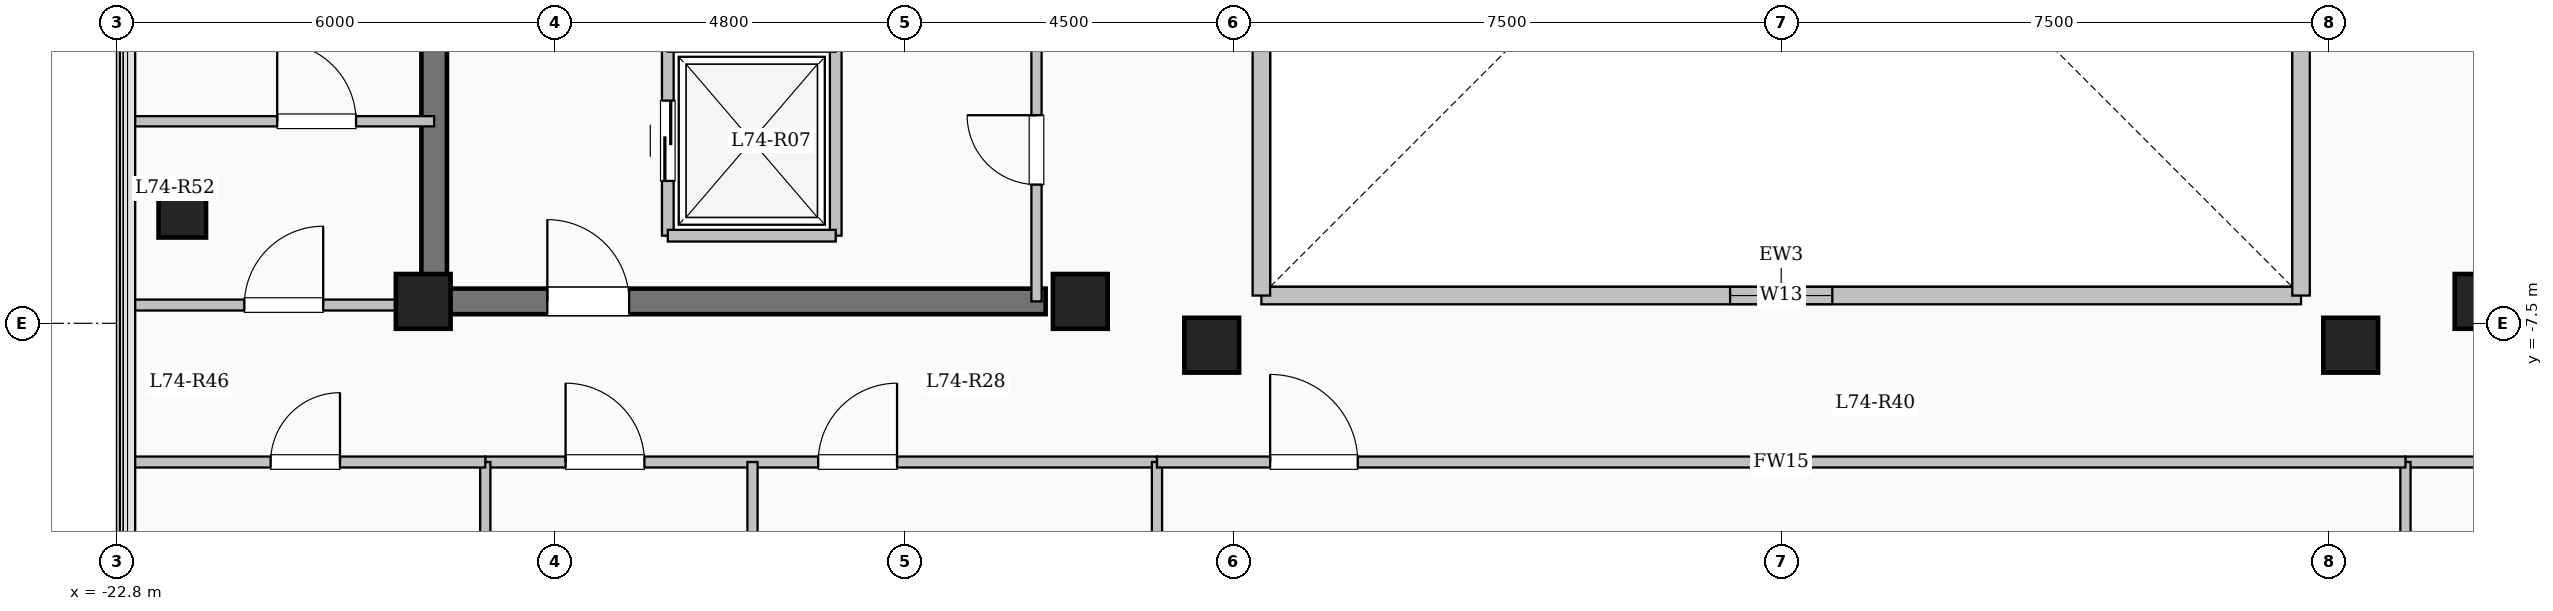
"""IFC4 building model, lengths in metres.
Left out: names, types, materials, properties, quantities, classifications, styles, units other than length and angle.
Written with IfcOpenShell. Run it as: python <this file> out.ifc"""

import sys

from ifc_helpers import new_model, si_unit, direction, frame, frame_2d, origin, origin_2d, place, context, subcontext, project, spatial, rectangle, extrude, element, fill, save


model = new_model("IFC4")
c1 = context("Model", 3, precision=1e-05, world=origin(), true_north=direction((0.0, 1.0)))
c2 = subcontext(c1, "Body", "Model", "MODEL_VIEW")
j1 = project(units=[si_unit("LENGTHUNIT", "METRE"), si_unit("PLANEANGLEUNIT", "RADIAN")], contexts=[c1])
p1 = place(None, origin())
s1 = spatial("IfcSite", under=j1, at=p1, CompositionType="ELEMENT")
p2 = place(p1, origin())
s2 = spatial("IfcBuilding", under=s1, at=p2, CompositionType="ELEMENT")
p3 = place(p2, frame((0.0, 0.0, 271.65)))
s3 = spatial("IfcBuildingStorey", under=s2, at=p3, CompositionType="ELEMENT", Elevation=271.65)
for number, where, z_axis, x_axis in (
    (1, (-7.8, -7.8, 0.0), (0.0, 0.0, 1.0), (1.0, 0.0, 0.0)),
    (2, (7.8, -7.8, 0.0), (0.0, 0.0, 1.0), (1.0, 0.0, 0.0)),
    (3, (-9.6, -7.2, 0.0), (0.0, 0.0, 1.0), (1.0, 0.0, 0.0)),
    (4, (9.6, -7.2, 0.0), (0.0, 0.0, 1.0), (1.0, 0.0, 0.0)),
    (5, (-18.6, -7.2, 0.0), (0.0, 0.0, 1.0), (1.0, 0.0, 0.0)),
):
    element("IfcColumn", number, at=place(p3, frame(where, z_axis=z_axis, x_axis=x_axis)), inside=s3, PredefinedType="COLUMN", context=c2, shape_type="SweptSolid", body=[
        extrude(rectangle(XDim=0.75, YDim=0.75, at=origin_2d()), origin(), (0.0, 0.0, 1.0), 4.65),
    ])
p4 = place(p3, frame((-21.9, -6.0, 0.0), z_axis=(0.0, 0.0, 1.0), x_axis=(1.0, 0.0, 0.0)))
e6 = element("IfcColumn", 6, at=p4, inside=s3, PredefinedType="COLUMN", context=c2, shape_type="SweptSolid", body=[
    extrude(rectangle(XDim=0.65, YDim=0.65, at=origin_2d()), origin(), (0.0, 0.0, 1.0), 4.65),
])
p5 = place(p3, frame((-7.12, -7.12, 0.0), z_axis=(0.0, 0.0, 1.0), x_axis=(1.0, 0.0, 0.0)))
e7 = element("IfcWall", 7, at=p5, inside=s3, PredefinedType="SOLIDWALL", context=c2, shape_type="SweptSolid", body=[
    extrude(rectangle(XDim=14.24, YDim=0.24, at=frame_2d((7.12, 0.0))), origin(), (0.0, 0.0, 1.0), 4.35),
])
p6 = place(p5, frame((6.42, 0.0, 0.95)))
e8 = element("IfcOpeningElement", 8, at=p6, cuts=e7, PredefinedType="OPENING", context=c2, shape_type="SweptSolid", body=[
    extrude(rectangle(XDim=1.4, YDim=1.5, at=frame_2d((0.7, 0.75))), frame((0.0, 0.13, 0.0), z_axis=(0.0, -1.0, 0.0), x_axis=(1.0, 0.0, 0.0)), (0.0, 0.0, 1.0), 0.26),
])
p7 = place(p3, frame((7.12, -7.12, 0.0), z_axis=(0.0, 0.0, 1.0), x_axis=(0.0, 1.0, 0.0)))
e9 = element("IfcWall", 9, at=p7, inside=s3, PredefinedType="SOLIDWALL", context=c2, shape_type="SweptSolid", body=[
    extrude(rectangle(XDim=14.24, YDim=0.24, at=frame_2d((7.12, 0.0))), origin(), (0.0, 0.0, 1.0), 4.35),
])
p8 = place(p7, frame((6.42, 0.0, 0.95)))
e10 = element("IfcOpeningElement", 10, at=p8, cuts=e9, PredefinedType="OPENING", context=c2, shape_type="SweptSolid", body=[
    extrude(rectangle(XDim=1.4, YDim=1.5, at=frame_2d((0.7, 0.75))), frame((0.0, 0.13, 0.0), z_axis=(0.0, -1.0, 0.0), x_axis=(1.0, 0.0, 0.0)), (0.0, 0.0, 1.0), 0.26),
])
p9 = place(p3, frame((-7.12, 7.12, 0.0), z_axis=(0.0, 0.0, 1.0), x_axis=(0.0, -1.0, 0.0)))
e11 = element("IfcWall", 11, at=p9, inside=s3, PredefinedType="SOLIDWALL", context=c2, shape_type="SweptSolid", body=[
    extrude(rectangle(XDim=14.24, YDim=0.24, at=frame_2d((7.12, 0.0))), origin(), (0.0, 0.0, 1.0), 4.35),
])
p10 = place(p9, frame((6.42, 0.0, 0.95)))
e12 = element("IfcOpeningElement", 12, at=p10, cuts=e11, PredefinedType="OPENING", context=c2, shape_type="SweptSolid", body=[
    extrude(rectangle(XDim=1.4, YDim=1.5, at=frame_2d((0.7, 0.75))), frame((0.0, 0.13, 0.0), z_axis=(0.0, -1.0, 0.0), x_axis=(1.0, 0.0, 0.0)), (0.0, 0.0, 1.0), 0.26),
])
p11 = place(p3, frame((-15.25, -6.3, 0.0), z_axis=(0.0, 0.0, 1.0), x_axis=(0.0, 1.0, 0.0)))
e13 = element("IfcWall", 13, at=p11, inside=s3, PredefinedType="SOLIDWALL", context=c2, shape_type="SweptSolid", body=[
    extrude(rectangle(XDim=2.6, YDim=0.16, at=frame_2d((1.3, 0.0))), origin(), (0.0, 0.0, 1.0), 4.35),
])
p12 = place(p11, frame((0.75, 0.0, 0.0)))
e14 = element("IfcOpeningElement", 14, at=p12, cuts=e13, PredefinedType="OPENING", context=c2, shape_type="SweptSolid", body=[
    extrude(rectangle(XDim=1.1, YDim=2.15, at=frame_2d((0.55, 1.075))), frame((0.0, 0.09, 0.0), z_axis=(0.0, -1.0, 0.0), x_axis=(1.0, 0.0, 0.0)), (0.0, 0.0, 1.0), 0.18),
])
p13 = place(p3, frame((-12.95, -6.3, 0.0), z_axis=(0.0, 0.0, 1.0), x_axis=(0.0, 1.0, 0.0)))
e15 = element("IfcWall", 15, at=p13, inside=s3, PredefinedType="SOLIDWALL", context=c2, shape_type="SweptSolid", body=[
    extrude(rectangle(XDim=2.6, YDim=0.16, at=frame_2d((1.3, 0.0))), origin(), (0.0, 0.0, 1.0), 4.35),
])
p14 = place(p3, frame((-15.25, -6.3, 0.0), z_axis=(0.0, 0.0, 1.0), x_axis=(1.0, 0.0, 0.0)))
e16 = element("IfcWall", 16, at=p14, inside=s3, PredefinedType="SOLIDWALL", context=c2, shape_type="SweptSolid", body=[
    extrude(rectangle(XDim=2.3, YDim=0.16, at=frame_2d((1.15, 0.0))), origin(), (0.0, 0.0, 1.0), 4.35),
])
p15 = place(p3, frame((-18.45, -7.375, 0.0), z_axis=(0.0, 0.0, 1.0), x_axis=(0.0, 1.0, 0.0)))
e17 = element("IfcWall", 17, at=p15, inside=s3, PredefinedType="SHEAR", context=c2, shape_type="SweptSolid", body=[
    extrude(rectangle(XDim=14.05, YDim=0.35, at=frame_2d((7.025, 0.0))), origin(), (0.0, 0.0, 1.0), 4.65),
])
p16 = place(p3, frame((-18.625, -7.2, 0.0), z_axis=(0.0, 0.0, 1.0), x_axis=(1.0, 0.0, 0.0)))
e18 = element("IfcWall", 18, at=p16, inside=s3, PredefinedType="SHEAR", context=c2, shape_type="SweptSolid", body=[
    extrude(rectangle(XDim=8.55, YDim=0.35, at=frame_2d((4.275, 0.0))), origin(), (0.0, 0.0, 1.0), 4.65),
])
p17 = place(p16, frame((1.725, 0.0, 0.0)))
e19 = element("IfcOpeningElement", 19, at=p17, cuts=e18, PredefinedType="OPENING", context=c2, shape_type="SweptSolid", body=[
    extrude(rectangle(XDim=1.12, YDim=2.15, at=frame_2d((0.56, 1.075))), frame((0.0, 0.185, 0.0), z_axis=(0.0, -1.0, 0.0), x_axis=(1.0, 0.0, 0.0)), (0.0, 0.0, 1.0), 0.37),
])
p18 = place(p3, frame((-10.2, -7.2, 0.0), z_axis=(0.0, 0.0, 1.0), x_axis=(0.0, 1.0, 0.0)))
e20 = element("IfcWall", 20, at=p18, inside=s3, PredefinedType="PARTITIONING", context=c2, shape_type="SweptSolid", body=[
    extrude(rectangle(XDim=9.12, YDim=0.14, at=frame_2d((4.56, 0.0))), origin(), (0.0, 0.0, 1.0), 4.35),
])
p19 = place(p18, frame((1.6, 0.0, 0.0)))
e21 = element("IfcOpeningElement", 21, at=p19, cuts=e20, PredefinedType="OPENING", context=c2, shape_type="SweptSolid", body=[
    extrude(rectangle(XDim=0.95, YDim=2.12, at=frame_2d((0.475, 1.06))), frame((0.0, 0.08, 0.0), z_axis=(0.0, -1.0, 0.0), x_axis=(1.0, 0.0, 0.0)), (0.0, 0.0, 1.0), 0.16),
])
p20 = place(p18, frame((7.9, 0.0, 0.0)))
e22 = element("IfcOpeningElement", 22, at=p20, cuts=e20, PredefinedType="OPENING", context=c2, shape_type="SweptSolid", body=[
    extrude(rectangle(XDim=0.95, YDim=2.12, at=frame_2d((0.475, 1.06))), frame((0.0, 0.08, 0.0), z_axis=(0.0, -1.0, 0.0), x_axis=(1.0, 0.0, 0.0)), (0.0, 0.0, 1.0), 0.16),
])
p21 = place(p3, frame((-17.75, -9.4, 0.0), z_axis=(0.0, 0.0, 1.0), x_axis=(1.0, 0.0, 0.0)))
e23 = element("IfcWall", 23, at=p21, inside=s3, PredefinedType="PARTITIONING", context=c2, shape_type="SweptSolid", body=[
    extrude(rectangle(XDim=9.2, YDim=0.15, at=frame_2d((4.6, 0.0))), origin(), (0.0, 0.0, 1.0), 4.35),
])
p22 = place(p21, frame((1.1, 0.0, 0.0)))
e24 = element("IfcOpeningElement", 24, at=p22, cuts=e23, PredefinedType="OPENING", context=c2, shape_type="SweptSolid", body=[
    extrude(rectangle(XDim=1.08, YDim=2.15, at=frame_2d((0.54, 1.075))), frame((0.0, 0.085, 0.0), z_axis=(0.0, -1.0, 0.0), x_axis=(1.0, 0.0, 0.0)), (0.0, 0.0, 1.0), 0.17),
])
p23 = place(p21, frame((4.56, 0.0, 0.0)))
e25 = element("IfcOpeningElement", 25, at=p23, cuts=e23, PredefinedType="OPENING", context=c2, shape_type="SweptSolid", body=[
    extrude(rectangle(XDim=1.08, YDim=2.15, at=frame_2d((0.54, 1.075))), frame((0.0, 0.085, 0.0), z_axis=(0.0, -1.0, 0.0), x_axis=(1.0, 0.0, 0.0)), (0.0, 0.0, 1.0), 0.17),
])
p24 = place(p3, frame((8.55, -9.4, 0.0), z_axis=(0.0, 0.0, 1.0), x_axis=(1.0, 0.0, 0.0)))
e26 = element("IfcWall", 26, at=p24, inside=s3, PredefinedType="PARTITIONING", context=c2, shape_type="SweptSolid", body=[
    extrude(rectangle(XDim=9.2, YDim=0.15, at=frame_2d((4.6, 0.0))), origin(), (0.0, 0.0, 1.0), 4.35),
])
p25 = place(p24, frame((1.1, 0.0, 0.0)))
e27 = element("IfcOpeningElement", 27, at=p25, cuts=e26, PredefinedType="OPENING", context=c2, shape_type="SweptSolid", body=[
    extrude(rectangle(XDim=1.08, YDim=2.15, at=frame_2d((0.54, 1.075))), frame((0.0, 0.085, 0.0), z_axis=(0.0, -1.0, 0.0), x_axis=(1.0, 0.0, 0.0)), (0.0, 0.0, 1.0), 0.17),
])
p26 = place(p24, frame((5.991, 0.0, 0.0)))
e28 = element("IfcOpeningElement", 28, at=p26, cuts=e26, PredefinedType="OPENING", context=c2, shape_type="SweptSolid", body=[
    extrude(rectangle(XDim=1.2, YDim=2.15, at=frame_2d((0.6, 1.075))), frame((0.0, 0.085, 0.0), z_axis=(0.0, -1.0, 0.0), x_axis=(1.0, 0.0, 0.0)), (0.0, 0.0, 1.0), 0.17),
])
p27 = place(p3, frame((-14.09, -20.9, 0.0), z_axis=(0.0, 0.0, 1.0), x_axis=(0.0, 1.0, 0.0)))
e29 = element("IfcWall", 29, at=p27, inside=s3, PredefinedType="PARTITIONING", context=c2, shape_type="SweptSolid", body=[
    extrude(rectangle(XDim=11.5, YDim=0.14, at=frame_2d((5.75, 0.0))), origin(), (0.0, 0.0, 1.0), 4.35),
])
for number, where, z_axis, x_axis in (
    (30, (-8.55, -21.504, 0.0), (0.0, 0.0, 1.0), (0.0, 1.0, 0.0)),
    (31, (8.55, -21.504, 0.0), (0.0, 0.0, 1.0), (0.0, 1.0, 0.0)),
):
    element("IfcWall", number, at=place(p3, frame(where, z_axis=z_axis, x_axis=x_axis)), inside=s3, PredefinedType="PARTITIONING", context=c2, shape_type="SweptSolid", body=[
        extrude(rectangle(XDim=12.104, YDim=0.14, at=frame_2d((6.052, 0.0))), origin(), (0.0, 0.0, 1.0), 4.35),
    ])
p28 = place(p3, frame((-8.55, -9.4, 0.0), z_axis=(0.0, 0.0, 1.0), x_axis=(1.0, 0.0, 0.0)))
e32 = element("IfcWall", 32, at=p28, inside=s3, PredefinedType="PARTITIONING", context=c2, shape_type="SweptSolid", body=[
    extrude(rectangle(XDim=17.1, YDim=0.15, at=frame_2d((8.55, 0.0))), origin(), (0.0, 0.0, 1.0), 4.35),
])
p29 = place(p28, frame((1.55, 0.0, 0.0)))
e33 = element("IfcOpeningElement", 33, at=p29, cuts=e32, PredefinedType="OPENING", context=c2, shape_type="SweptSolid", body=[
    extrude(rectangle(XDim=1.2, YDim=2.15, at=frame_2d((0.6, 1.075))), frame((0.0, 0.085, 0.0), z_axis=(0.0, -1.0, 0.0), x_axis=(1.0, 0.0, 0.0)), (0.0, 0.0, 1.0), 0.17),
])
p30 = place(p3, frame((-22.68, -7.25, 0.0), z_axis=(0.0, 0.0, 1.0), x_axis=(1.0, 0.0, 0.0)))
e34 = element("IfcWall", 34, at=p30, inside=s3, PredefinedType="PARTITIONING", context=c2, shape_type="SweptSolid", body=[
    extrude(rectangle(XDim=4.23, YDim=0.15, at=frame_2d((2.115, 0.0))), origin(), (0.0, 0.0, 1.0), 4.35),
])
p31 = place(p30, frame((1.63, 0.0, 0.0)))
e35 = element("IfcOpeningElement", 35, at=p31, cuts=e34, PredefinedType="OPENING", context=c2, shape_type="SweptSolid", body=[
    extrude(rectangle(XDim=1.08, YDim=2.15, at=frame_2d((0.54, 1.075))), frame((0.0, 0.085, 0.0), z_axis=(0.0, -1.0, 0.0), x_axis=(1.0, 0.0, 0.0)), (0.0, 0.0, 1.0), 0.17),
])
p32 = place(p3, frame((-17.75, -17.55, 0.0), z_axis=(0.0, 0.0, 1.0), x_axis=(0.0, 1.0, 0.0)))
e36 = element("IfcWall", 36, at=p32, inside=s3, PredefinedType="PARTITIONING", context=c2, shape_type="SweptSolid", body=[
    extrude(rectangle(XDim=8.15, YDim=0.14, at=frame_2d((4.075, 0.0))), origin(), (0.0, 0.0, 1.0), 4.35),
])
p33 = place(p3, frame((-22.68, -9.4, 0.0), z_axis=(0.0, 0.0, 1.0), x_axis=(1.0, 0.0, 0.0)))
e37 = element("IfcWall", 37, at=p33, inside=s3, PredefinedType="PARTITIONING", context=c2, shape_type="SweptSolid", body=[
    extrude(rectangle(XDim=4.93, YDim=0.15, at=frame_2d((2.465, 0.0))), origin(), (0.0, 0.0, 1.0), 4.35),
])
p34 = place(p33, frame((1.99, 0.0, 0.0)))
e38 = element("IfcOpeningElement", 38, at=p34, cuts=e37, PredefinedType="OPENING", context=c2, shape_type="SweptSolid", body=[
    extrude(rectangle(XDim=0.95, YDim=2.15, at=frame_2d((0.475, 1.075))), frame((0.0, 0.085, 0.0), z_axis=(0.0, -1.0, 0.0), x_axis=(1.0, 0.0, 0.0)), (0.0, 0.0, 1.0), 0.17),
])
p35 = place(p3, frame((-22.68, -4.733, 0.0), z_axis=(0.0, 0.0, 1.0), x_axis=(1.0, 0.0, 0.0)))
e39 = element("IfcWall", 39, at=p35, inside=s3, PredefinedType="PARTITIONING", context=c2, shape_type="SweptSolid", body=[
    extrude(rectangle(XDim=4.23, YDim=0.14, at=frame_2d((2.115, 0.0))), origin(), (0.0, 0.0, 1.0), 4.35),
])
p36 = place(p35, frame((2.08, 0.0, 0.0)))
e40 = element("IfcOpeningElement", 40, at=p36, cuts=e39, PredefinedType="OPENING", context=c2, shape_type="SweptSolid", body=[
    extrude(rectangle(XDim=1.08, YDim=2.15, at=frame_2d((0.54, 1.075))), frame((0.0, 0.08, 0.0), z_axis=(0.0, -1.0, 0.0), x_axis=(1.0, 0.0, 0.0)), (0.0, 0.0, 1.0), 0.16),
])
p37 = place(p6, origin())
e41 = element("IfcWindow", 41, at=p37, inside=s3, PartitioningType="SINGLE_PANEL", PredefinedType="WINDOW", context=c2, shape_type="SweptSolid", body=[
    extrude(rectangle(XDim=1.4, YDim=1.5, at=frame_2d((0.7, 0.75))), frame((0.0, 0.03, 0.0), z_axis=(0.0, -1.0, 0.0), x_axis=(1.0, 0.0, 0.0)), (0.0, 0.0, 1.0), 0.06),
])
fill(e8, e41)
p38 = place(p12, origin())
e42 = element("IfcDoor", 42, at=p38, inside=s3, OperationType="SLIDING_TO_LEFT", PredefinedType="DOOR", context=c2, shape_type="SweptSolid", body=[
    extrude(rectangle(XDim=1.1, YDim=2.15, at=frame_2d((0.55, 1.075))), frame((0.0, 0.025, 0.0), z_axis=(0.0, -1.0, 0.0), x_axis=(1.0, 0.0, 0.0)), (0.0, 0.0, 1.0), 0.05),
])
fill(e14, e42)
p39 = place(p17, origin())
e43 = element("IfcDoor", 43, at=p39, inside=s3, OperationType="SINGLE_SWING_LEFT", PredefinedType="DOOR", context=c2, shape_type="SweptSolid", body=[
    extrude(rectangle(XDim=1.12, YDim=2.15, at=frame_2d((0.56, 1.075))), frame((0.0, 0.025, 0.0), z_axis=(0.0, -1.0, 0.0), x_axis=(1.0, 0.0, 0.0)), (0.0, 0.0, 1.0), 0.05),
])
fill(e19, e43)
p40 = place(p19, origin())
e44 = element("IfcDoor", 44, at=p40, inside=s3, OperationType="SINGLE_SWING_RIGHT", PredefinedType="DOOR", context=c2, shape_type="SweptSolid", body=[
    extrude(rectangle(XDim=0.95, YDim=2.12, at=frame_2d((0.475, 1.06))), frame((0.0, 0.025, 0.0), z_axis=(0.0, -1.0, 0.0), x_axis=(1.0, 0.0, 0.0)), (0.0, 0.0, 1.0), 0.05),
])
fill(e21, e44)
p41 = place(p22, origin())
e45 = element("IfcDoor", 45, at=p41, inside=s3, OperationType="SINGLE_SWING_LEFT", PredefinedType="DOOR", context=c2, shape_type="SweptSolid", body=[
    extrude(rectangle(XDim=1.08, YDim=2.15, at=frame_2d((0.54, 1.075))), frame((0.0, 0.025, 0.0), z_axis=(0.0, -1.0, 0.0), x_axis=(1.0, 0.0, 0.0)), (0.0, 0.0, 1.0), 0.05),
])
fill(e24, e45)
p42 = place(p23, origin())
e46 = element("IfcDoor", 46, at=p42, inside=s3, OperationType="SINGLE_SWING_RIGHT", PredefinedType="DOOR", context=c2, shape_type="SweptSolid", body=[
    extrude(rectangle(XDim=1.08, YDim=2.15, at=frame_2d((0.54, 1.075))), frame((0.0, 0.025, 0.0), z_axis=(0.0, -1.0, 0.0), x_axis=(1.0, 0.0, 0.0)), (0.0, 0.0, 1.0), 0.05),
])
fill(e25, e46)
p43 = place(p29, origin())
e47 = element("IfcDoor", 47, at=p43, inside=s3, OperationType="SINGLE_SWING_LEFT", PredefinedType="DOOR", context=c2, shape_type="SweptSolid", body=[
    extrude(rectangle(XDim=1.2, YDim=2.15, at=frame_2d((0.6, 1.075))), frame((0.0, 0.025, 0.0), z_axis=(0.0, -1.0, 0.0), x_axis=(1.0, 0.0, 0.0)), (0.0, 0.0, 1.0), 0.05),
])
fill(e33, e47)
p44 = place(p34, origin())
e48 = element("IfcDoor", 48, at=p44, inside=s3, OperationType="SINGLE_SWING_RIGHT", PredefinedType="DOOR", context=c2, shape_type="SweptSolid", body=[
    extrude(rectangle(XDim=0.95, YDim=2.15, at=frame_2d((0.475, 1.075))), frame((0.0, 0.025, 0.0), z_axis=(0.0, -1.0, 0.0), x_axis=(1.0, 0.0, 0.0)), (0.0, 0.0, 1.0), 0.05),
])
fill(e38, e48)
p45 = place(p31, origin())
e49 = element("IfcDoor", 49, at=p45, inside=s3, OperationType="SINGLE_SWING_RIGHT", PredefinedType="DOOR", context=c2, shape_type="SweptSolid", body=[
    extrude(rectangle(XDim=1.08, YDim=2.15, at=frame_2d((0.54, 1.075))), frame((0.0, 0.025, 0.0), z_axis=(0.0, -1.0, 0.0), x_axis=(1.0, 0.0, 0.0)), (0.0, 0.0, 1.0), 0.05),
])
fill(e35, e49)
p46 = place(p36, origin())
e50 = element("IfcDoor", 50, at=p46, inside=s3, OperationType="SINGLE_SWING_LEFT", PredefinedType="DOOR", context=c2, shape_type="SweptSolid", body=[
    extrude(rectangle(XDim=1.08, YDim=2.15, at=frame_2d((0.54, 1.075))), frame((0.0, 0.025, 0.0), z_axis=(0.0, -1.0, 0.0), x_axis=(1.0, 0.0, 0.0)), (0.0, 0.0, 1.0), 0.05),
])
fill(e40, e50)
save(model, sys.argv[1])
